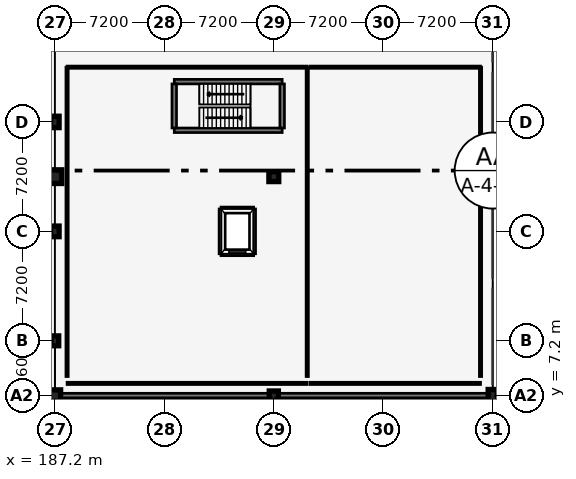
"""IFC4 building model, lengths in metres.
Left out: names, types, materials, properties, quantities, classifications, styles, units other than length and angle.
Written with IfcOpenShell. Run it as: python <this file> out.ifc"""

import sys

from ifc_helpers import new_model, si_unit, direction, frame, frame_2d, origin, origin_2d, place, context, subcontext, project, spatial, rectangle, circle, extrude, element, fill, save


model = new_model("IFC4")
c1 = context("Model", 3, precision=1e-05, world=origin(), true_north=direction((0.0, 1.0)))
c2 = subcontext(c1, "Body", "Model", "MODEL_VIEW")
j1 = project(units=[si_unit("LENGTHUNIT", "METRE"), si_unit("PLANEANGLEUNIT", "RADIAN")], contexts=[c1])
p1 = place(None, origin())
s1 = spatial("IfcSite", under=j1, at=p1, CompositionType="ELEMENT")
p2 = place(p1, origin())
s2 = spatial("IfcBuilding", under=s1, at=p2, CompositionType="ELEMENT")
p3 = place(p2, origin())
s3 = spatial("IfcBuildingStorey", under=s2, at=p3, CompositionType="ELEMENT", Elevation=0.0)
p4 = place(p3, frame((187.2, 7.2, 0.0), z_axis=(0.0, 0.0, 1.0), x_axis=(1.0, 0.0, 0.0)))
e1 = element("IfcColumn", 1, at=p4, inside=s3, PredefinedType="COLUMN", context=c2, shape_type="SweptSolid", body=[
    extrude(circle(Radius=0.375, at=origin_2d()), origin(), (0.0, 0.0, 1.0), 4.8),
])
p5 = place(p3, frame((187.2, 10.8, 0.0), z_axis=(0.0, 0.0, 1.0), x_axis=(1.0, 0.0, 0.0)))
e2 = element("IfcColumn", 2, at=p5, inside=s3, PredefinedType="COLUMN", context=c2, shape_type="SweptSolid", body=[
    extrude(rectangle(XDim=0.5, YDim=0.65, at=origin_2d()), origin(), (0.0, 0.0, 1.0), 4.8),
])
p6 = place(p3, frame((187.2, 18.0, 0.0), z_axis=(0.0, 0.0, 1.0), x_axis=(1.0, 0.0, 0.0)))
e3 = element("IfcColumn", 3, at=p6, inside=s3, PredefinedType="COLUMN", context=c2, shape_type="SweptSolid", body=[
    extrude(rectangle(XDim=0.55, YDim=0.7, at=origin_2d()), origin(), (0.0, 0.0, 1.0), 4.8),
])
p7 = place(p3, frame((187.2, 21.6, 0.0), z_axis=(0.0, 0.0, 1.0), x_axis=(1.0, 0.0, 0.0)))
e4 = element("IfcColumn", 4, at=p7, inside=s3, PredefinedType="COLUMN", context=c2, shape_type="SweptSolid", body=[
    extrude(circle(Radius=0.45, at=origin_2d()), origin(), (0.0, 0.0, 1.0), 4.8),
])
p8 = place(p3, frame((187.2, 25.2, 0.0), z_axis=(0.0, 0.0, 1.0), x_axis=(1.0, 0.0, 0.0)))
e5 = element("IfcColumn", 5, at=p8, inside=s3, PredefinedType="COLUMN", context=c2, shape_type="SweptSolid", body=[
    extrude(rectangle(XDim=0.55, YDim=0.75, at=origin_2d()), origin(), (0.0, 0.0, 1.0), 4.8),
])
p9 = place(p3, frame((201.6, 7.2, 0.0), z_axis=(0.0, 0.0, 1.0), x_axis=(1.0, 0.0, 0.0)))
e6 = element("IfcColumn", 6, at=p9, inside=s3, PredefinedType="COLUMN", context=c2, shape_type="SweptSolid", body=[
    extrude(rectangle(XDim=0.6, YDim=0.6, at=origin_2d()), origin(), (0.0, 0.0, 1.0), 4.8),
])
p10 = place(p3, frame((201.6, 21.6, 0.0), z_axis=(0.0, 0.0, 1.0), x_axis=(1.0, 0.0, 0.0)))
e7 = element("IfcColumn", 7, at=p10, inside=s3, PredefinedType="COLUMN", context=c2, shape_type="SweptSolid", body=[
    extrude(rectangle(XDim=0.65, YDim=0.65, at=origin_2d()), origin(), (0.0, 0.0, 1.0), 4.8),
])
for number, where, z_axis, x_axis in (
    (8, (216.0, 7.2, 0.0), (0.0, 0.0, 1.0), (1.0, 0.0, 0.0)),
    (9, (216.0, 21.6, 0.0), (0.0, 0.0, 1.0), (1.0, 0.0, 0.0)),
):
    element("IfcColumn", number, at=place(p3, frame(where, z_axis=z_axis, x_axis=x_axis)), inside=s3, PredefinedType="COLUMN", context=c2, shape_type="SweptSolid", body=[
        extrude(rectangle(XDim=0.6, YDim=0.8, at=origin_2d()), origin(), (0.0, 0.0, 1.0), 4.8),
    ])
p11 = place(p3, frame((108.0, 10.8, 0.0), z_axis=(0.0, 0.0, 1.0), x_axis=(1.0, 0.0, 0.0)))
e10 = element("IfcWall", 10, at=p11, inside=s3, PredefinedType="SOLIDWALL", context=c2, shape_type="SweptSolid", body=[
    extrude(rectangle(XDim=79.2, YDim=0.32, at=frame_2d((39.6, 0.0))), origin(), (0.0, 0.0, 1.0), 4.25),
])
p12 = place(p11, frame((2.2, 0.0, 0.72)))
e11 = element("IfcOpeningElement", 11, at=p12, cuts=e10, PredefinedType="OPENING", context=c2, shape_type="SweptSolid", body=[
    extrude(rectangle(XDim=1.8, YDim=2.15, at=frame_2d((0.9, 1.075))), frame((0.0, 0.17, 0.0), z_axis=(0.0, -1.0, 0.0), x_axis=(1.0, 0.0, 0.0)), (0.0, 0.0, 1.0), 0.34),
])
p13 = place(p11, frame((9.4, 0.0, 0.72)))
e12 = element("IfcOpeningElement", 12, at=p13, cuts=e10, PredefinedType="OPENING", context=c2, shape_type="SweptSolid", body=[
    extrude(rectangle(XDim=1.2, YDim=2.0, at=frame_2d((0.6, 1.0))), frame((0.0, 0.17, 0.0), z_axis=(0.0, -1.0, 0.0), x_axis=(1.0, 0.0, 0.0)), (0.0, 0.0, 1.0), 0.34),
])
p14 = place(p11, frame((16.6, 0.0, 0.72)))
e13 = element("IfcOpeningElement", 13, at=p14, cuts=e10, PredefinedType="OPENING", context=c2, shape_type="SweptSolid", body=[
    extrude(rectangle(XDim=1.35, YDim=2.05, at=frame_2d((0.675, 1.025))), frame((0.0, 0.17, 0.0), z_axis=(0.0, -1.0, 0.0), x_axis=(1.0, 0.0, 0.0)), (0.0, 0.0, 1.0), 0.34),
])
p15 = place(p11, frame((23.8, 0.0, 0.72)))
e14 = element("IfcOpeningElement", 14, at=p15, cuts=e10, PredefinedType="OPENING", context=c2, shape_type="SweptSolid", body=[
    extrude(rectangle(XDim=1.5, YDim=2.1, at=frame_2d((0.75, 1.05))), frame((0.0, 0.17, 0.0), z_axis=(0.0, -1.0, 0.0), x_axis=(1.0, 0.0, 0.0)), (0.0, 0.0, 1.0), 0.34),
])
p16 = place(p11, frame((31.0, 0.0, 0.72)))
e15 = element("IfcOpeningElement", 15, at=p16, cuts=e10, PredefinedType="OPENING", context=c2, shape_type="SweptSolid", body=[
    extrude(rectangle(XDim=1.65, YDim=2.1, at=frame_2d((0.825, 1.05))), frame((0.0, 0.17, 0.0), z_axis=(0.0, -1.0, 0.0), x_axis=(1.0, 0.0, 0.0)), (0.0, 0.0, 1.0), 0.34),
])
p17 = place(p11, frame((38.2, 0.0, 0.72)))
e16 = element("IfcOpeningElement", 16, at=p17, cuts=e10, PredefinedType="OPENING", context=c2, shape_type="SweptSolid", body=[
    extrude(rectangle(XDim=1.8, YDim=2.15, at=frame_2d((0.9, 1.075))), frame((0.0, 0.17, 0.0), z_axis=(0.0, -1.0, 0.0), x_axis=(1.0, 0.0, 0.0)), (0.0, 0.0, 1.0), 0.34),
])
p18 = place(p11, frame((45.4, 0.0, 0.72)))
e17 = element("IfcOpeningElement", 17, at=p18, cuts=e10, PredefinedType="OPENING", context=c2, shape_type="SweptSolid", body=[
    extrude(rectangle(XDim=1.2, YDim=2.0, at=frame_2d((0.6, 1.0))), frame((0.0, 0.17, 0.0), z_axis=(0.0, -1.0, 0.0), x_axis=(1.0, 0.0, 0.0)), (0.0, 0.0, 1.0), 0.34),
])
p19 = place(p11, frame((52.6, 0.0, 0.72)))
e18 = element("IfcOpeningElement", 18, at=p19, cuts=e10, PredefinedType="OPENING", context=c2, shape_type="SweptSolid", body=[
    extrude(rectangle(XDim=1.35, YDim=2.05, at=frame_2d((0.675, 1.025))), frame((0.0, 0.17, 0.0), z_axis=(0.0, -1.0, 0.0), x_axis=(1.0, 0.0, 0.0)), (0.0, 0.0, 1.0), 0.34),
])
p20 = place(p11, frame((59.8, 0.0, 0.72)))
e19 = element("IfcOpeningElement", 19, at=p20, cuts=e10, PredefinedType="OPENING", context=c2, shape_type="SweptSolid", body=[
    extrude(rectangle(XDim=1.5, YDim=2.1, at=frame_2d((0.75, 1.05))), frame((0.0, 0.17, 0.0), z_axis=(0.0, -1.0, 0.0), x_axis=(1.0, 0.0, 0.0)), (0.0, 0.0, 1.0), 0.34),
])
p21 = place(p11, frame((67.0, 0.0, 0.72)))
e20 = element("IfcOpeningElement", 20, at=p21, cuts=e10, PredefinedType="OPENING", context=c2, shape_type="SweptSolid", body=[
    extrude(rectangle(XDim=1.65, YDim=2.1, at=frame_2d((0.825, 1.05))), frame((0.0, 0.17, 0.0), z_axis=(0.0, -1.0, 0.0), x_axis=(1.0, 0.0, 0.0)), (0.0, 0.0, 1.0), 0.34),
])
p22 = place(p3, frame((187.2, 7.2, 0.0), z_axis=(0.0, 0.0, 1.0), x_axis=(1.0, 0.0, 0.0)))
e21 = element("IfcWall", 21, at=p22, inside=s3, PredefinedType="SOLIDWALL", context=c2, shape_type="SweptSolid", body=[
    extrude(rectangle(XDim=28.8, YDim=0.3, at=frame_2d((14.4, 0.0))), origin(), (0.0, 0.0, 1.0), 4.25),
])
p23 = place(p22, frame((5.0, 0.0, 0.0)))
e22 = element("IfcOpeningElement", 22, at=p23, cuts=e21, PredefinedType="OPENING", context=c2, shape_type="SweptSolid", body=[
    extrude(rectangle(XDim=2.0, YDim=2.35, at=frame_2d((1.0, 1.175))), frame((0.0, 0.16, 0.0), z_axis=(0.0, -1.0, 0.0), x_axis=(1.0, 0.0, 0.0)), (0.0, 0.0, 1.0), 0.32),
])
p24 = place(p22, frame((17.5, 0.0, 0.0)))
e23 = element("IfcOpeningElement", 23, at=p24, cuts=e21, PredefinedType="OPENING", context=c2, shape_type="SweptSolid", body=[
    extrude(rectangle(XDim=2.0, YDim=2.35, at=frame_2d((1.0, 1.175))), frame((0.0, 0.16, 0.0), z_axis=(0.0, -1.0, 0.0), x_axis=(1.0, 0.0, 0.0)), (0.0, 0.0, 1.0), 0.32),
])
p25 = place(p3, frame((195.05, 24.65, 0.0), z_axis=(0.0, 0.0, 1.0), x_axis=(1.0, 0.0, 0.0)))
e24 = element("IfcWall", 24, at=p25, inside=s3, PredefinedType="SHEAR", context=c2, shape_type="SweptSolid", body=[
    extrude(rectangle(XDim=7.1, YDim=0.3, at=frame_2d((3.55, 0.0))), origin(), (0.0, 0.0, 1.0), 4.55),
])
p26 = place(p3, frame((202.15, 27.85, 0.0), z_axis=(0.0, 0.0, 1.0), x_axis=(-1.0, 0.0, 0.0)))
e25 = element("IfcWall", 25, at=p26, inside=s3, PredefinedType="SHEAR", context=c2, shape_type="SweptSolid", body=[
    extrude(rectangle(XDim=7.1, YDim=0.3, at=frame_2d((3.55, 0.0))), origin(), (0.0, 0.0, 1.0), 4.55),
])
p27 = place(p26, frame((5.6, 0.0, 0.0)))
e26 = element("IfcOpeningElement", 26, at=p27, cuts=e25, PredefinedType="OPENING", context=c2, shape_type="SweptSolid", body=[
    extrude(rectangle(XDim=1.05, YDim=2.15, at=frame_2d((0.525, 1.075))), frame((0.0, 0.16, 0.0), z_axis=(0.0, -1.0, 0.0), x_axis=(1.0, 0.0, 0.0)), (0.0, 0.0, 1.0), 0.32),
])
for number, where, z_axis, x_axis in (
    (27, (202.15, 24.8, 0.0), (0.0, 0.0, 1.0), (0.0, 1.0, 0.0)),
    (28, (195.05, 27.7, 0.0), (0.0, 0.0, 1.0), (0.0, -1.0, 0.0)),
):
    element("IfcWall", number, at=place(p3, frame(where, z_axis=z_axis, x_axis=x_axis)), inside=s3, PredefinedType="SHEAR", context=c2, shape_type="SweptSolid", body=[
        extrude(rectangle(XDim=2.9, YDim=0.3, at=frame_2d((1.45, 0.0))), origin(), (0.0, 0.0, 1.0), 4.55),
    ])
p28 = place(p3, frame((198.125, 16.525, 0.0), z_axis=(0.0, 0.0, 1.0), x_axis=(1.0, 0.0, 0.0)))
e29 = element("IfcWall", 29, at=p28, inside=s3, PredefinedType="SHEAR", context=c2, shape_type="SweptSolid", body=[
    extrude(rectangle(XDim=2.15, YDim=0.25, at=frame_2d((1.075, 0.0))), origin(), (0.0, 0.0, 1.0), 4.5),
])
p29 = place(p3, frame((200.275, 19.475, 0.0), z_axis=(0.0, 0.0, 1.0), x_axis=(-1.0, 0.0, 0.0)))
e30 = element("IfcWall", 30, at=p29, inside=s3, PredefinedType="SHEAR", context=c2, shape_type="SweptSolid", body=[
    extrude(rectangle(XDim=2.15, YDim=0.25, at=frame_2d((1.075, 0.0))), origin(), (0.0, 0.0, 1.0), 4.5),
])
p30 = place(p29, frame((0.525, 0.0, 0.0)))
e31 = element("IfcOpeningElement", 31, at=p30, cuts=e30, PredefinedType="OPENING", context=c2, shape_type="SweptSolid", body=[
    extrude(rectangle(XDim=1.1, YDim=2.15, at=frame_2d((0.55, 1.075))), frame((0.0, 0.135, 0.0), z_axis=(0.0, -1.0, 0.0), x_axis=(1.0, 0.0, 0.0)), (0.0, 0.0, 1.0), 0.27),
])
for number, where, z_axis, x_axis in (
    (32, (198.125, 19.475, 0.0), (0.0, 0.0, 1.0), (0.0, -1.0, 0.0)),
    (33, (200.275, 16.525, 0.0), (0.0, 0.0, 1.0), (0.0, 1.0, 0.0)),
):
    element("IfcWall", number, at=place(p3, frame(where, z_axis=z_axis, x_axis=x_axis)), inside=s3, PredefinedType="SHEAR", context=c2, shape_type="SweptSolid", body=[
        extrude(rectangle(XDim=2.95, YDim=0.25, at=frame_2d((1.475, 0.0))), origin(), (0.0, 0.0, 1.0), 4.5),
    ])
p31 = place(p3, frame((203.8, 8.0, 0.0), z_axis=(0.0, 0.0, 1.0), x_axis=(-1.0, 0.0, 0.0)))
e34 = element("IfcWall", 34, at=p31, inside=s3, PredefinedType="PARTITIONING", context=c2, shape_type="SweptSolid", body=[
    extrude(rectangle(XDim=15.8, YDim=0.15, at=frame_2d((7.9, 0.0))), origin(), (0.0, 0.0, 1.0), 3.92),
])
for number, where, z_axis, x_axis in (
    (35, (203.8, 8.45, 0.0), (0.0, 0.0, 1.0), (0.0, 1.0, 0.0)),
    (36, (188.0, 28.8, 0.0), (0.0, 0.0, 1.0), (0.0, -1.0, 0.0)),
):
    element("IfcWall", number, at=place(p3, frame(where, z_axis=z_axis, x_axis=x_axis)), inside=s3, PredefinedType="PARTITIONING", context=c2, shape_type="SweptSolid", body=[
        extrude(rectangle(XDim=20.35, YDim=0.15, at=frame_2d((10.175, 0.0))), origin(), (0.0, 0.0, 1.0), 3.92),
    ])
p32 = place(p3, frame((188.0, 28.8, 0.0), z_axis=(0.0, 0.0, 1.0), x_axis=(1.0, 0.0, 0.0)))
e37 = element("IfcWall", 37, at=p32, inside=s3, PredefinedType="PARTITIONING", context=c2, shape_type="SweptSolid", body=[
    extrude(rectangle(XDim=15.8, YDim=0.15, at=frame_2d((7.9, 0.0))), origin(), (0.0, 0.0, 1.0), 4.1),
])
p33 = place(p32, frame((7.0, 0.0, 0.0)))
e38 = element("IfcOpeningElement", 38, at=p33, cuts=e37, PredefinedType="OPENING", context=c2, shape_type="SweptSolid", body=[
    extrude(rectangle(XDim=1.8, YDim=2.2, at=frame_2d((0.9, 1.1))), frame((0.0, 0.085, 0.0), z_axis=(0.0, -1.0, 0.0), x_axis=(1.0, 0.0, 0.0)), (0.0, 0.0, 1.0), 0.17),
])
p34 = place(p3, frame((215.2, 8.0, 0.0), z_axis=(0.0, 0.0, 1.0), x_axis=(-1.0, 0.0, 0.0)))
e39 = element("IfcWall", 39, at=p34, inside=s3, PredefinedType="PARTITIONING", context=c2, shape_type="SweptSolid", body=[
    extrude(rectangle(XDim=11.2, YDim=0.15, at=frame_2d((5.6, 0.0))), origin(), (0.0, 0.0, 1.0), 4.1),
])
p35 = place(p3, frame((215.2, 8.45, 0.0), z_axis=(0.0, 0.0, 1.0), x_axis=(0.0, 1.0, 0.0)))
e40 = element("IfcWall", 40, at=p35, inside=s3, PredefinedType="PARTITIONING", context=c2, shape_type="SweptSolid", body=[
    extrude(rectangle(XDim=20.35, YDim=0.15, at=frame_2d((10.175, 0.0))), origin(), (0.0, 0.0, 1.0), 3.92),
])
p36 = place(p3, frame((204.0, 28.8, 0.0), z_axis=(0.0, 0.0, 1.0), x_axis=(1.0, 0.0, 0.0)))
e41 = element("IfcWall", 41, at=p36, inside=s3, PredefinedType="PARTITIONING", context=c2, shape_type="SweptSolid", body=[
    extrude(rectangle(XDim=11.2, YDim=0.15, at=frame_2d((5.6, 0.0))), origin(), (0.0, 0.0, 1.0), 4.1),
])
p37 = place(p36, frame((4.7, 0.0, 0.0)))
e42 = element("IfcOpeningElement", 42, at=p37, cuts=e41, PredefinedType="OPENING", context=c2, shape_type="SweptSolid", body=[
    extrude(rectangle(XDim=1.8, YDim=2.2, at=frame_2d((0.9, 1.1))), frame((0.0, 0.085, 0.0), z_axis=(0.0, -1.0, 0.0), x_axis=(1.0, 0.0, 0.0)), (0.0, 0.0, 1.0), 0.17),
])
p38 = place(p23, frame((2.0, 0.0, 0.0), z_axis=(0.0, 0.0, 1.0), x_axis=(-1.0, 0.0, 0.0)))
e43 = element("IfcDoor", 43, at=p38, inside=s3, OperationType="DOUBLE_SWING_LEFT", PredefinedType="DOOR", context=c2, shape_type="SweptSolid", body=[
    extrude(rectangle(XDim=2.0, YDim=2.35, at=frame_2d((1.0, 1.175))), frame((0.0, 0.025, 0.0), z_axis=(0.0, -1.0, 0.0), x_axis=(1.0, 0.0, 0.0)), (0.0, 0.0, 1.0), 0.05),
])
fill(e22, e43)
p39 = place(p24, frame((2.0, 0.0, 0.0), z_axis=(0.0, 0.0, 1.0), x_axis=(-1.0, 0.0, 0.0)))
e44 = element("IfcDoor", 44, at=p39, inside=s3, OperationType="DOUBLE_SWING_LEFT", PredefinedType="DOOR", context=c2, shape_type="SweptSolid", body=[
    extrude(rectangle(XDim=2.0, YDim=2.35, at=frame_2d((1.0, 1.175))), frame((0.0, 0.025, 0.0), z_axis=(0.0, -1.0, 0.0), x_axis=(1.0, 0.0, 0.0)), (0.0, 0.0, 1.0), 0.05),
])
fill(e23, e44)
p40 = place(p27, frame((1.05, 0.0, 0.0), z_axis=(0.0, 0.0, 1.0), x_axis=(-1.0, 0.0, 0.0)))
e45 = element("IfcDoor", 45, at=p40, inside=s3, OperationType="SINGLE_SWING_LEFT", PredefinedType="DOOR", context=c2, shape_type="SweptSolid", body=[
    extrude(rectangle(XDim=1.05, YDim=2.15, at=frame_2d((0.525, 1.075))), frame((0.0, 0.025, 0.0), z_axis=(0.0, -1.0, 0.0), x_axis=(1.0, 0.0, 0.0)), (0.0, 0.0, 1.0), 0.05),
])
fill(e26, e45)
p41 = place(p30, origin())
e46 = element("IfcDoor", 46, at=p41, inside=s3, OperationType="SLIDING_TO_LEFT", PredefinedType="DOOR", context=c2, shape_type="SweptSolid", body=[
    extrude(rectangle(XDim=1.1, YDim=2.15, at=frame_2d((0.55, 1.075))), frame((0.0, 0.025, 0.0), z_axis=(0.0, -1.0, 0.0), x_axis=(1.0, 0.0, 0.0)), (0.0, 0.0, 1.0), 0.05),
])
fill(e31, e46)
p42 = place(p33, origin())
e47 = element("IfcDoor", 47, at=p42, inside=s3, OperationType="DOUBLE_SWING_RIGHT", PredefinedType="DOOR", context=c2, shape_type="SweptSolid", body=[
    extrude(rectangle(XDim=1.8, YDim=2.2, at=frame_2d((0.9, 1.1))), frame((0.0, 0.025, 0.0), z_axis=(0.0, -1.0, 0.0), x_axis=(1.0, 0.0, 0.0)), (0.0, 0.0, 1.0), 0.05),
])
fill(e38, e47)
p43 = place(p37, origin())
e48 = element("IfcDoor", 48, at=p43, inside=s3, OperationType="DOUBLE_SWING_RIGHT", PredefinedType="DOOR", context=c2, shape_type="SweptSolid", body=[
    extrude(rectangle(XDim=1.8, YDim=2.2, at=frame_2d((0.9, 1.1))), frame((0.0, 0.025, 0.0), z_axis=(0.0, -1.0, 0.0), x_axis=(1.0, 0.0, 0.0)), (0.0, 0.0, 1.0), 0.05),
])
fill(e42, e48)
save(model, sys.argv[1])
